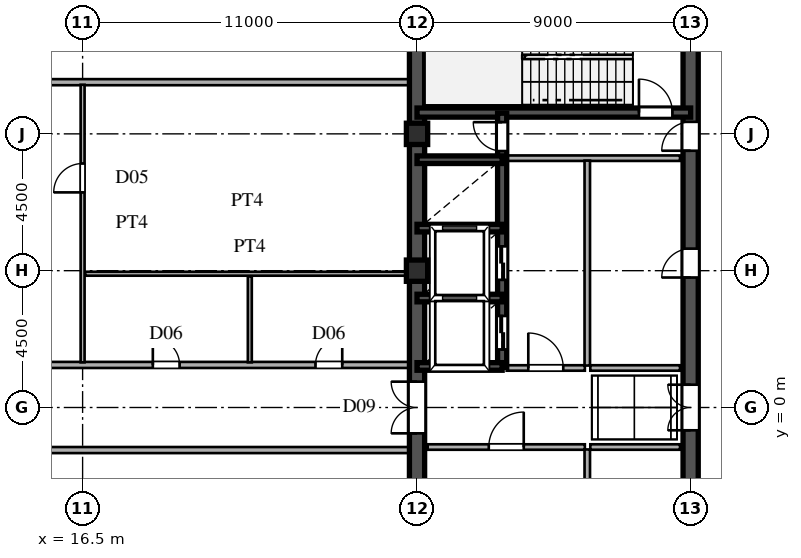
"""IFC4 building model, lengths in metres.
Left out: names, types, materials, properties, quantities, classifications, styles, units other than length and angle.
Written with IfcOpenShell. Run it as: python <this file> out.ifc"""

import sys

from ifc_helpers import new_model, si_unit, direction, frame, frame_2d, origin, origin_2d, place, context, subcontext, project, spatial, rectangle, hollow_rectangle, extrude, source, transform, mapped, element, fill, save


model = new_model("IFC4")
c1 = context("Model", 3, precision=1e-05, world=origin(), true_north=direction((0.0, 1.0)))
c2 = subcontext(c1, "Body", "Model", "MODEL_VIEW")
j1 = project(units=[si_unit("LENGTHUNIT", "METRE"), si_unit("PLANEANGLEUNIT", "RADIAN")], contexts=[c1])
p1 = place(None, origin())
s1 = spatial("IfcSite", under=j1, at=p1, CompositionType="ELEMENT")
p2 = place(p1, origin())
s2 = spatial("IfcBuilding", under=s1, at=p2, CompositionType="ELEMENT")
p3 = place(p2, frame((0.0, 0.0, 229.8)))
s3 = spatial("IfcBuildingStorey", under=s2, at=p3, CompositionType="ELEMENT", Elevation=229.8)
m1 = source(origin(), c2, "Body", "SweptSolid", [
    extrude(hollow_rectangle(XDim=0.7, YDim=0.7, WallThickness=0.03, at=origin_2d()), origin(), (0.0, 0.0, 1.0), 4.8),
])
for number, where, z_axis, x_axis in (
    (1, (27.5, 4.5, 0.0), (0.0, 0.0, 1.0), (1.0, 0.0, 0.0)),
    (2, (27.5, 9.0, 0.0), (0.0, 0.0, 1.0), (1.0, 0.0, 0.0)),
):
    element("IfcColumn", number, at=place(p3, frame(where, z_axis=z_axis, x_axis=x_axis)), inside=s3, PredefinedType="COLUMN", context=c2, shape_type="MappedRepresentation", body=[
        mapped(m1, transform((0.0, 0.0, 0.0), scale=1.0)),
    ])
for number, where, z_axis, x_axis in (
    (3, (27.5, -13.5, 0.0), (0.0, 0.0, 1.0), (0.0, 1.0, 0.0)),
    (4, (27.5, 1.3, 0.0), (0.0, 0.0, 1.0), (0.0, 1.0, 0.0)),
):
    element("IfcWall", number, at=place(p3, frame(where, z_axis=z_axis, x_axis=x_axis)), inside=s3, PredefinedType="SHEAR", context=c2, shape_type="SweptSolid", body=[
        extrude(rectangle(XDim=12.2, YDim=0.5, at=frame_2d((6.1, 0.0))), origin(), (0.0, 0.0, 1.0), 4.54),
    ])
p4 = place(p3, frame((27.5, -1.3, 0.0), z_axis=(0.0, 0.0, 1.0), x_axis=(0.0, 1.0, 0.0)))
e5 = element("IfcWall", 5, at=p4, inside=s3, PredefinedType="SHEAR", context=c2, shape_type="SweptSolid", body=[
    extrude(rectangle(XDim=2.6, YDim=0.5, at=frame_2d((1.3, 0.0))), origin(), (0.0, 0.0, 1.0), 4.54),
])
p5 = place(p4, frame((0.45, 0.0, 0.0)))
e6 = element("IfcOpeningElement", 6, at=p5, cuts=e5, PredefinedType="OPENING", context=c2, shape_type="SweptSolid", body=[
    extrude(rectangle(XDim=1.7, YDim=2.35, at=frame_2d((0.85, 1.175))), frame((0.0, 0.26, 0.0), z_axis=(0.0, -1.0, 0.0), x_axis=(1.0, 0.0, 0.0)), (0.0, 0.0, 1.0), 0.52),
])
p6 = place(p3, frame((36.5, -1.3, 0.0), z_axis=(0.0, 0.0, 1.0), x_axis=(0.0, 1.0, 0.0)))
e7 = element("IfcWall", 7, at=p6, inside=s3, PredefinedType="SHEAR", context=c2, shape_type="SweptSolid", body=[
    extrude(rectangle(XDim=2.6, YDim=0.5, at=frame_2d((1.3, 0.0))), origin(), (0.0, 0.0, 1.0), 4.54),
])
p7 = place(p6, frame((0.55, 0.0, 0.0)))
e8 = element("IfcOpeningElement", 8, at=p7, cuts=e7, PredefinedType="OPENING", context=c2, shape_type="SweptSolid", body=[
    extrude(rectangle(XDim=1.5, YDim=2.3, at=frame_2d((0.75, 1.15))), frame((0.0, 0.26, 0.0), z_axis=(0.0, -1.0, 0.0), x_axis=(1.0, 0.0, 0.0)), (0.0, 0.0, 1.0), 0.52),
])
p8 = place(p3, frame((36.5, 8.2, 0.0), z_axis=(0.0, 0.0, 1.0), x_axis=(0.0, 1.0, 0.0)))
e9 = element("IfcWall", 9, at=p8, inside=s3, PredefinedType="SHEAR", context=c2, shape_type="SweptSolid", body=[
    extrude(rectangle(XDim=5.45, YDim=0.5, at=frame_2d((2.725, 0.0))), origin(), (0.0, 0.0, 1.0), 4.54),
])
p9 = place(p8, frame((0.245, 0.0, 0.0)))
e10 = element("IfcOpeningElement", 10, at=p9, cuts=e9, PredefinedType="OPENING", context=c2, shape_type="SweptSolid", body=[
    extrude(rectangle(XDim=0.95, YDim=2.15, at=frame_2d((0.475, 1.075))), frame((0.0, 0.26, 0.0), z_axis=(0.0, -1.0, 0.0), x_axis=(1.0, 0.0, 0.0)), (0.0, 0.0, 1.0), 0.52),
])
p10 = place(p3, frame((36.5, -6.5, 0.0), z_axis=(0.0, 0.0, 1.0), x_axis=(0.0, 1.0, 0.0)))
e11 = element("IfcWall", 11, at=p10, inside=s3, PredefinedType="SHEAR", context=c2, shape_type="SweptSolid", body=[
    extrude(rectangle(XDim=5.2, YDim=0.5, at=frame_2d((2.6, 0.0))), origin(), (0.0, 0.0, 1.0), 4.54),
])
p11 = place(p10, frame((2.125, 0.0, 0.0)))
e12 = element("IfcOpeningElement", 12, at=p11, cuts=e11, PredefinedType="OPENING", context=c2, shape_type="SweptSolid", body=[
    extrude(rectangle(XDim=0.95, YDim=2.15, at=frame_2d((0.475, 1.075))), frame((0.0, 0.26, 0.0), z_axis=(0.0, -1.0, 0.0), x_axis=(1.0, 0.0, 0.0)), (0.0, 0.0, 1.0), 0.52),
])
p12 = place(p3, frame((36.5, 1.3, 0.0), z_axis=(0.0, 0.0, 1.0), x_axis=(0.0, 1.0, 0.0)))
e13 = element("IfcWall", 13, at=p12, inside=s3, PredefinedType="SHEAR", context=c2, shape_type="SweptSolid", body=[
    extrude(rectangle(XDim=6.9, YDim=0.5, at=frame_2d((3.45, 0.0))), origin(), (0.0, 0.0, 1.0), 4.54),
])
p13 = place(p12, frame((2.975, 0.0, 0.0)))
e14 = element("IfcOpeningElement", 14, at=p13, cuts=e13, PredefinedType="OPENING", context=c2, shape_type="SweptSolid", body=[
    extrude(rectangle(XDim=0.95, YDim=2.15, at=frame_2d((0.475, 1.075))), frame((0.0, 0.26, 0.0), z_axis=(0.0, -1.0, 0.0), x_axis=(1.0, 0.0, 0.0)), (0.0, 0.0, 1.0), 0.52),
])
p14 = place(p3, frame((27.5, 9.7, 0.0), z_axis=(0.0, 0.0, 1.0), x_axis=(1.0, 0.0, 0.0)))
e15 = element("IfcWall", 15, at=p14, inside=s3, PredefinedType="SHEAR", context=c2, shape_type="SweptSolid", body=[
    extrude(rectangle(XDim=9.0, YDim=0.3, at=frame_2d((4.5, 0.0))), origin(), (0.0, 0.0, 1.0), 4.54),
])
p15 = place(p14, frame((7.3, 0.0, 0.0)))
e16 = element("IfcOpeningElement", 16, at=p15, cuts=e15, PredefinedType="OPENING", context=c2, shape_type="SweptSolid", body=[
    extrude(rectangle(XDim=1.1, YDim=2.2, at=frame_2d((0.55, 1.1))), frame((0.0, 0.16, 0.0), z_axis=(0.0, -1.0, 0.0), x_axis=(1.0, 0.0, 0.0)), (0.0, 0.0, 1.0), 0.32),
])
for number, where, z_axis, x_axis in (
    (17, (27.5, 1.35, 0.0), (0.0, 0.0, 1.0), (1.0, 0.0, 0.0)),
    (18, (27.5, 3.6, 0.0), (0.0, 0.0, 1.0), (1.0, 0.0, 0.0)),
    (19, (27.5, 5.9, 0.0), (0.0, 0.0, 1.0), (1.0, 0.0, 0.0)),
    (20, (27.5, 8.15, 0.0), (0.0, 0.0, 1.0), (1.0, 0.0, 0.0)),
):
    element("IfcWall", number, at=place(p3, frame(where, z_axis=z_axis, x_axis=x_axis)), inside=s3, PredefinedType="SHEAR", context=c2, shape_type="SweptSolid", body=[
        extrude(rectangle(XDim=2.8, YDim=0.25, at=frame_2d((1.4, 0.0))), origin(), (0.0, 0.0, 1.0), 4.54),
    ])
p16 = place(p3, frame((30.3, 1.32, 0.0), z_axis=(0.0, 0.0, 1.0), x_axis=(0.0, 1.0, 0.0)))
e21 = element("IfcWall", 21, at=p16, inside=s3, PredefinedType="SHEAR", context=c2, shape_type="SweptSolid", body=[
    extrude(rectangle(XDim=2.28, YDim=0.3, at=frame_2d((1.14, 0.0))), origin(), (0.0, 0.0, 1.0), 4.54),
])
p17 = place(p16, frame((0.59, 0.0, 0.0)))
e22 = element("IfcOpeningElement", 22, at=p17, cuts=e21, PredefinedType="OPENING", context=c2, shape_type="SweptSolid", body=[
    extrude(rectangle(XDim=1.1, YDim=2.2, at=frame_2d((0.55, 1.1))), frame((0.0, 0.16, 0.0), z_axis=(0.0, -1.0, 0.0), x_axis=(1.0, 0.0, 0.0)), (0.0, 0.0, 1.0), 0.32),
])
p18 = place(p3, frame((30.3, 3.6, 0.0), z_axis=(0.0, 0.0, 1.0), x_axis=(0.0, 1.0, 0.0)))
e23 = element("IfcWall", 23, at=p18, inside=s3, PredefinedType="SHEAR", context=c2, shape_type="SweptSolid", body=[
    extrude(rectangle(XDim=2.3, YDim=0.3, at=frame_2d((1.15, 0.0))), origin(), (0.0, 0.0, 1.0), 4.54),
])
p19 = place(p18, frame((0.6, 0.0, 0.0)))
e24 = element("IfcOpeningElement", 24, at=p19, cuts=e23, PredefinedType="OPENING", context=c2, shape_type="SweptSolid", body=[
    extrude(rectangle(XDim=1.1, YDim=2.2, at=frame_2d((0.55, 1.1))), frame((0.0, 0.16, 0.0), z_axis=(0.0, -1.0, 0.0), x_axis=(1.0, 0.0, 0.0)), (0.0, 0.0, 1.0), 0.32),
])
p20 = place(p3, frame((30.3, 5.9, 0.0), z_axis=(0.0, 0.0, 1.0), x_axis=(0.0, 1.0, 0.0)))
e25 = element("IfcWall", 25, at=p20, inside=s3, PredefinedType="SHEAR", context=c2, shape_type="SweptSolid", body=[
    extrude(rectangle(XDim=2.25, YDim=0.3, at=frame_2d((1.125, 0.0))), origin(), (0.0, 0.0, 1.0), 4.54),
])
p21 = place(p3, frame((30.3, 8.15, 0.0), z_axis=(0.0, 0.0, 1.0), x_axis=(0.0, 1.0, 0.0)))
e26 = element("IfcWall", 26, at=p21, inside=s3, PredefinedType="SHEAR", context=c2, shape_type="SweptSolid", body=[
    extrude(rectangle(XDim=1.53, YDim=0.3, at=frame_2d((0.765, 0.0))), origin(), (0.0, 0.0, 1.0), 4.54),
])
p22 = place(p21, frame((0.285, 0.0, 0.0)))
e27 = element("IfcOpeningElement", 27, at=p22, cuts=e26, PredefinedType="OPENING", context=c2, shape_type="SweptSolid", body=[
    extrude(rectangle(XDim=0.95, YDim=2.15, at=frame_2d((0.475, 1.075))), frame((0.0, 0.16, 0.0), z_axis=(0.0, -1.0, 0.0), x_axis=(1.0, 0.0, 0.0)), (0.0, 0.0, 1.0), 0.32),
])
p23 = place(p3, frame((30.45, 8.2, 0.0), z_axis=(0.0, 0.0, 1.0), x_axis=(1.0, 0.0, 0.0)))
e28 = element("IfcWall", 28, at=p23, inside=s3, PredefinedType="PARTITIONING", context=c2, shape_type="SweptSolid", body=[
    extrude(rectangle(XDim=5.7, YDim=0.18, at=frame_2d((2.85, 0.0))), origin(), (0.0, 0.0, 1.0), 4.54),
])
p24 = place(p3, frame((33.1, -6.42, 0.0), z_axis=(0.0, 0.0, 1.0), x_axis=(0.0, 1.0, 0.0)))
e29 = element("IfcWall", 29, at=p24, inside=s3, PredefinedType="PARTITIONING", context=c2, shape_type="SweptSolid", body=[
    extrude(rectangle(XDim=5.04, YDim=0.18, at=frame_2d((2.52, 0.0))), origin(), (0.0, 0.0, 1.0), 4.54),
])
p25 = place(p3, frame((33.1, 1.38, 0.0), z_axis=(0.0, 0.0, 1.0), x_axis=(0.0, 1.0, 0.0)))
e30 = element("IfcWall", 30, at=p25, inside=s3, PredefinedType="PARTITIONING", context=c2, shape_type="SweptSolid", body=[
    extrude(rectangle(XDim=6.74, YDim=0.18, at=frame_2d((3.37, 0.0))), origin(), (0.0, 0.0, 1.0), 4.54),
])
p26 = place(p3, frame((27.85, -1.3, 0.0), z_axis=(0.0, 0.0, 1.0), x_axis=(1.0, 0.0, 0.0)))
e31 = element("IfcWall", 31, at=p26, inside=s3, PredefinedType="PARTITIONING", context=c2, shape_type="SweptSolid", body=[
    extrude(rectangle(XDim=5.17, YDim=0.18, at=frame_2d((2.585, 0.0))), origin(), (0.0, 0.0, 1.0), 4.54),
])
p27 = place(p26, frame((2.01, 0.0, 0.0)))
e32 = element("IfcOpeningElement", 32, at=p27, cuts=e31, PredefinedType="OPENING", context=c2, shape_type="SweptSolid", body=[
    extrude(rectangle(XDim=1.15, YDim=2.2, at=frame_2d((0.575, 1.1))), frame((0.0, 0.1, 0.0), z_axis=(0.0, -1.0, 0.0), x_axis=(1.0, 0.0, 0.0)), (0.0, 0.0, 1.0), 0.2),
])
p28 = place(p3, frame((30.45, 1.3, 0.0), z_axis=(0.0, 0.0, 1.0), x_axis=(1.0, 0.0, 0.0)))
e33 = element("IfcWall", 33, at=p28, inside=s3, PredefinedType="PARTITIONING", context=c2, shape_type="SweptSolid", body=[
    extrude(rectangle(XDim=2.57, YDim=0.18, at=frame_2d((1.285, 0.0))), origin(), (0.0, 0.0, 1.0), 4.54),
])
p29 = place(p28, frame((0.71, 0.0, 0.0)))
e34 = element("IfcOpeningElement", 34, at=p29, cuts=e33, PredefinedType="OPENING", context=c2, shape_type="SweptSolid", body=[
    extrude(rectangle(XDim=1.15, YDim=2.2, at=frame_2d((0.575, 1.1))), frame((0.0, 0.1, 0.0), z_axis=(0.0, -1.0, 0.0), x_axis=(1.0, 0.0, 0.0)), (0.0, 0.0, 1.0), 0.2),
])
for number, where, z_axis, x_axis in (
    (35, (33.2, -1.3, 0.0), (0.0, 0.0, 1.0), (1.0, 0.0, 0.0)),
    (36, (33.2, 1.3, 0.0), (0.0, 0.0, 1.0), (1.0, 0.0, 0.0)),
):
    element("IfcWall", number, at=place(p3, frame(where, z_axis=z_axis, x_axis=x_axis)), inside=s3, PredefinedType="PARTITIONING", context=c2, shape_type="SweptSolid", body=[
        extrude(rectangle(XDim=2.95, YDim=0.18, at=frame_2d((1.475, 0.0))), origin(), (0.0, 0.0, 1.0), 4.54),
    ])
p30 = place(p3, frame((-27.245, -1.4, 0.0), z_axis=(0.0, 0.0, 1.0), x_axis=(1.0, 0.0, 0.0)))
e37 = element("IfcWall", 37, at=p30, inside=s3, PredefinedType="PARTITIONING", context=c2, shape_type="SweptSolid", body=[
    extrude(rectangle(XDim=54.49, YDim=0.2, at=frame_2d((27.245, 0.0))), origin(), (0.0, 0.0, 1.0), 4.54),
])
p31 = place(p30, frame((25.77, 0.0, 0.0)))
e38 = element("IfcOpeningElement", 38, at=p31, cuts=e37, PredefinedType="OPENING", context=c2, shape_type="SweptSolid", body=[
    extrude(rectangle(XDim=1.15, YDim=2.2, at=frame_2d((0.575, 1.1))), frame((0.0, 0.11, 0.0), z_axis=(0.0, -1.0, 0.0), x_axis=(1.0, 0.0, 0.0)), (0.0, 0.0, 1.0), 0.22),
])
p32 = place(p30, frame((17.67, 0.0, 0.0)))
e39 = element("IfcOpeningElement", 39, at=p32, cuts=e37, PredefinedType="OPENING", context=c2, shape_type="SweptSolid", body=[
    extrude(rectangle(XDim=1.15, YDim=2.2, at=frame_2d((0.575, 1.1))), frame((0.0, 0.11, 0.0), z_axis=(0.0, -1.0, 0.0), x_axis=(1.0, 0.0, 0.0)), (0.0, 0.0, 1.0), 0.22),
])
p33 = place(p30, frame((35.17, 0.0, 0.0)))
e40 = element("IfcOpeningElement", 40, at=p33, cuts=e37, PredefinedType="OPENING", context=c2, shape_type="SweptSolid", body=[
    extrude(rectangle(XDim=1.15, YDim=2.2, at=frame_2d((0.575, 1.1))), frame((0.0, 0.11, 0.0), z_axis=(0.0, -1.0, 0.0), x_axis=(1.0, 0.0, 0.0)), (0.0, 0.0, 1.0), 0.22),
])
p34 = place(p3, frame((-27.245, 1.4, 0.0), z_axis=(0.0, 0.0, 1.0), x_axis=(1.0, 0.0, 0.0)))
e41 = element("IfcWall", 41, at=p34, inside=s3, PredefinedType="PARTITIONING", context=c2, shape_type="SweptSolid", body=[
    extrude(rectangle(XDim=54.49, YDim=0.2, at=frame_2d((27.245, 0.0))), origin(), (0.0, 0.0, 1.0), 4.54),
])
p35 = place(p34, frame((25.77, 0.0, 0.0)))
e42 = element("IfcOpeningElement", 42, at=p35, cuts=e41, PredefinedType="OPENING", context=c2, shape_type="SweptSolid", body=[
    extrude(rectangle(XDim=1.15, YDim=2.2, at=frame_2d((0.575, 1.1))), frame((0.0, 0.11, 0.0), z_axis=(0.0, -1.0, 0.0), x_axis=(1.0, 0.0, 0.0)), (0.0, 0.0, 1.0), 0.22),
])
p36 = place(p34, frame((35.17, 0.0, 0.0)))
e43 = element("IfcOpeningElement", 43, at=p36, cuts=e41, PredefinedType="OPENING", context=c2, shape_type="SweptSolid", body=[
    extrude(rectangle(XDim=1.15, YDim=2.2, at=frame_2d((0.575, 1.1))), frame((0.0, 0.11, 0.0), z_axis=(0.0, -1.0, 0.0), x_axis=(1.0, 0.0, 0.0)), (0.0, 0.0, 1.0), 0.22),
])
p37 = place(p34, frame((17.67, 0.0, 0.0)))
e44 = element("IfcOpeningElement", 44, at=p37, cuts=e41, PredefinedType="OPENING", context=c2, shape_type="SweptSolid", body=[
    extrude(rectangle(XDim=1.15, YDim=2.2, at=frame_2d((0.575, 1.1))), frame((0.0, 0.11, 0.0), z_axis=(0.0, -1.0, 0.0), x_axis=(1.0, 0.0, 0.0)), (0.0, 0.0, 1.0), 0.22),
])
p38 = place(p34, frame((46.055, 0.0, 0.0)))
e45 = element("IfcOpeningElement", 45, at=p38, cuts=e41, PredefinedType="OPENING", context=c2, shape_type="SweptSolid", body=[
    extrude(rectangle(XDim=0.88, YDim=2.1, at=frame_2d((0.44, 1.05))), frame((0.0, 0.11, 0.0), z_axis=(0.0, -1.0, 0.0), x_axis=(1.0, 0.0, 0.0)), (0.0, 0.0, 1.0), 0.22),
])
p39 = place(p34, frame((51.405, 0.0, 0.0)))
e46 = element("IfcOpeningElement", 46, at=p39, cuts=e41, PredefinedType="OPENING", context=c2, shape_type="SweptSolid", body=[
    extrude(rectangle(XDim=0.88, YDim=2.1, at=frame_2d((0.44, 1.05))), frame((0.0, 0.11, 0.0), z_axis=(0.0, -1.0, 0.0), x_axis=(1.0, 0.0, 0.0)), (0.0, 0.0, 1.0), 0.22),
])
p40 = place(p3, frame((16.585, 4.4, 0.0), z_axis=(0.0, 0.0, 1.0), x_axis=(1.0, 0.0, 0.0)))
e47 = element("IfcWall", 47, at=p40, inside=s3, PredefinedType="PARTITIONING", context=c2, shape_type="SweptSolid", body=[
    extrude(rectangle(XDim=10.66, YDim=0.13, at=frame_2d((5.33, 0.0))), origin(), (0.0, 0.0, 1.0), 4.54),
])
p41 = place(p3, frame((-27.245, 10.7, 0.0), z_axis=(0.0, 0.0, 1.0), x_axis=(1.0, 0.0, 0.0)))
e48 = element("IfcWall", 48, at=p41, inside=s3, PredefinedType="PARTITIONING", context=c2, shape_type="SweptSolid", body=[
    extrude(rectangle(XDim=54.49, YDim=0.2, at=frame_2d((27.245, 0.0))), origin(), (0.0, 0.0, 1.0), 4.54),
])
p42 = place(p41, frame((25.77, 0.0, 0.0)))
e49 = element("IfcOpeningElement", 49, at=p42, cuts=e48, PredefinedType="OPENING", context=c2, shape_type="SweptSolid", body=[
    extrude(rectangle(XDim=1.15, YDim=2.2, at=frame_2d((0.575, 1.1))), frame((0.0, 0.11, 0.0), z_axis=(0.0, -1.0, 0.0), x_axis=(1.0, 0.0, 0.0)), (0.0, 0.0, 1.0), 0.22),
])
p43 = place(p3, frame((16.5, 1.485, 0.0), z_axis=(0.0, 0.0, 1.0), x_axis=(0.0, 1.0, 0.0)))
e50 = element("IfcWall", 50, at=p43, inside=s3, PredefinedType="PARTITIONING", context=c2, shape_type="SweptSolid", body=[
    extrude(rectangle(XDim=9.13, YDim=0.13, at=frame_2d((4.565, 0.0))), origin(), (0.0, 0.0, 1.0), 3.44),
])
p44 = place(p43, frame((5.59, 0.0, 0.0)))
e51 = element("IfcOpeningElement", 51, at=p44, cuts=e50, PredefinedType="OPENING", context=c2, shape_type="SweptSolid", body=[
    extrude(rectangle(XDim=0.95, YDim=2.15, at=frame_2d((0.475, 1.075))), frame((0.0, 0.075, 0.0), z_axis=(0.0, -1.0, 0.0), x_axis=(1.0, 0.0, 0.0)), (0.0, 0.0, 1.0), 0.15),
])
p45 = place(p3, frame((22.0, 1.485, 0.0), z_axis=(0.0, 0.0, 1.0), x_axis=(0.0, 1.0, 0.0)))
e52 = element("IfcWall", 52, at=p45, inside=s3, PredefinedType="PARTITIONING", context=c2, shape_type="SweptSolid", body=[
    extrude(rectangle(XDim=2.83, YDim=0.13, at=frame_2d((1.415, 0.0))), origin(), (0.0, 0.0, 1.0), 3.44),
])
m2 = source(origin(), c2, "Body", "SweptSolid", [
    extrude(rectangle(XDim=1.7, YDim=2.35, at=frame_2d((0.85, 1.175))), frame((0.0, 0.025, 0.0), z_axis=(0.0, -1.0, 0.0), x_axis=(1.0, 0.0, 0.0)), (0.0, 0.0, 1.0), 0.05),
])
p46 = place(p5, origin())
e53 = element("IfcDoor", 53, at=p46, inside=s3, OperationType="DOUBLE_SWING_LEFT", PredefinedType="DOOR", context=c2, shape_type="MappedRepresentation", body=[
    mapped(m2, transform((0.0, 0.0, 0.0), scale=1.0)),
])
fill(e6, e53)
m3 = source(origin(), c2, "Body", "SweptSolid", [
    extrude(rectangle(XDim=1.5, YDim=2.3, at=frame_2d((0.75, 1.15))), frame((0.0, 0.025, 0.0), z_axis=(0.0, -1.0, 0.0), x_axis=(1.0, 0.0, 0.0)), (0.0, 0.0, 1.0), 0.05),
])
p47 = place(p7, origin())
e54 = element("IfcDoor", 54, at=p47, inside=s3, OperationType="DOUBLE_SWING_LEFT", PredefinedType="DOOR", context=c2, shape_type="MappedRepresentation", body=[
    mapped(m3, transform((0.0, 0.0, 0.0), scale=1.0)),
])
fill(e8, e54)
m4 = source(origin(), c2, "Body", "SweptSolid", [
    extrude(rectangle(XDim=0.95, YDim=2.15, at=frame_2d((0.475, 1.075))), frame((0.0, 0.025, 0.0), z_axis=(0.0, -1.0, 0.0), x_axis=(1.0, 0.0, 0.0)), (0.0, 0.0, 1.0), 0.05),
])
p48 = place(p9, origin())
e55 = element("IfcDoor", 55, at=p48, inside=s3, OperationType="SINGLE_SWING_LEFT", PredefinedType="DOOR", context=c2, shape_type="MappedRepresentation", body=[
    mapped(m4, transform((0.0, 0.0, 0.0), scale=1.0)),
])
fill(e10, e55)
p49 = place(p13, origin())
e56 = element("IfcDoor", 56, at=p49, inside=s3, OperationType="SINGLE_SWING_LEFT", PredefinedType="DOOR", context=c2, shape_type="MappedRepresentation", body=[
    mapped(m4, transform((0.0, 0.0, 0.0), scale=1.0)),
])
fill(e14, e56)
m5 = source(origin(), c2, "Body", "SweptSolid", [
    extrude(rectangle(XDim=1.1, YDim=2.2, at=frame_2d((0.55, 1.1))), frame((0.0, 0.025, 0.0), z_axis=(0.0, -1.0, 0.0), x_axis=(1.0, 0.0, 0.0)), (0.0, 0.0, 1.0), 0.05),
])
p50 = place(p15, origin())
e57 = element("IfcDoor", 57, at=p50, inside=s3, OperationType="SINGLE_SWING_LEFT", PredefinedType="DOOR", context=c2, shape_type="MappedRepresentation", body=[
    mapped(m5, transform((0.0, 0.0, 0.0), scale=1.0)),
])
fill(e16, e57)
m6 = source(origin(), c2, "Body", "SweptSolid", [
    extrude(rectangle(XDim=1.1, YDim=2.2, at=frame_2d((0.55, 1.1))), frame((0.0, 0.025, 0.0), z_axis=(0.0, -1.0, 0.0), x_axis=(1.0, 0.0, 0.0)), (0.0, 0.0, 1.0), 0.05),
])
p51 = place(p17, origin())
e58 = element("IfcDoor", 58, at=p51, inside=s3, OperationType="DOUBLE_DOOR_SLIDING", PredefinedType="DOOR", context=c2, shape_type="MappedRepresentation", body=[
    mapped(m6, transform((0.0, 0.0, 0.0), scale=1.0)),
])
fill(e22, e58)
p52 = place(p19, origin())
e59 = element("IfcDoor", 59, at=p52, inside=s3, OperationType="DOUBLE_DOOR_SLIDING", PredefinedType="DOOR", context=c2, shape_type="MappedRepresentation", body=[
    mapped(m6, transform((0.0, 0.0, 0.0), scale=1.0)),
])
fill(e24, e59)
p53 = place(p22, origin())
e60 = element("IfcDoor", 60, at=p53, inside=s3, OperationType="SINGLE_SWING_RIGHT", PredefinedType="DOOR", context=c2, shape_type="MappedRepresentation", body=[
    mapped(m4, transform((0.0, 0.0, 0.0), scale=1.0)),
])
fill(e27, e60)
m7 = source(origin(), c2, "Body", "SweptSolid", [
    extrude(rectangle(XDim=1.15, YDim=2.2, at=frame_2d((0.575, 1.1))), frame((0.0, 0.025, 0.0), z_axis=(0.0, -1.0, 0.0), x_axis=(1.0, 0.0, 0.0)), (0.0, 0.0, 1.0), 0.05),
])
p54 = place(p27, origin())
e61 = element("IfcDoor", 61, at=p54, inside=s3, OperationType="SINGLE_SWING_RIGHT", PredefinedType="DOOR", context=c2, shape_type="MappedRepresentation", body=[
    mapped(m7, transform((0.0, 0.0, 0.0), scale=1.0)),
])
fill(e32, e61)
p55 = place(p29, origin())
e62 = element("IfcDoor", 62, at=p55, inside=s3, OperationType="SINGLE_SWING_LEFT", PredefinedType="DOOR", context=c2, shape_type="MappedRepresentation", body=[
    mapped(m7, transform((0.0, 0.0, 0.0), scale=1.0)),
])
fill(e34, e62)
m8 = source(origin(), c2, "Body", "SweptSolid", [
    extrude(rectangle(XDim=0.88, YDim=2.1, at=frame_2d((0.44, 1.05))), frame((0.0, 0.025, 0.0), z_axis=(0.0, -1.0, 0.0), x_axis=(1.0, 0.0, 0.0)), (0.0, 0.0, 1.0), 0.05),
])
p56 = place(p38, origin())
e63 = element("IfcDoor", 63, at=p56, inside=s3, OperationType="SINGLE_SWING_LEFT", PredefinedType="DOOR", context=c2, shape_type="MappedRepresentation", body=[
    mapped(m8, transform((0.0, 0.0, 0.0), scale=1.0)),
])
fill(e45, e63)
p57 = place(p39, origin())
e64 = element("IfcDoor", 64, at=p57, inside=s3, OperationType="SINGLE_SWING_RIGHT", PredefinedType="DOOR", context=c2, shape_type="MappedRepresentation", body=[
    mapped(m8, transform((0.0, 0.0, 0.0), scale=1.0)),
])
fill(e46, e64)
m9 = source(origin(), c2, "Body", "SweptSolid", [
    extrude(rectangle(XDim=0.95, YDim=2.15, at=frame_2d((0.475, 1.075))), frame((0.0, 0.025, 0.0), z_axis=(0.0, -1.0, 0.0), x_axis=(1.0, 0.0, 0.0)), (0.0, 0.0, 1.0), 0.05),
])
p58 = place(p44, origin())
e65 = element("IfcDoor", 65, at=p58, inside=s3, OperationType="SINGLE_SWING_LEFT", PredefinedType="DOOR", context=c2, shape_type="MappedRepresentation", body=[
    mapped(m9, transform((0.0, 0.0, 0.0), scale=1.0)),
])
fill(e51, e65)
save(model, sys.argv[1])
